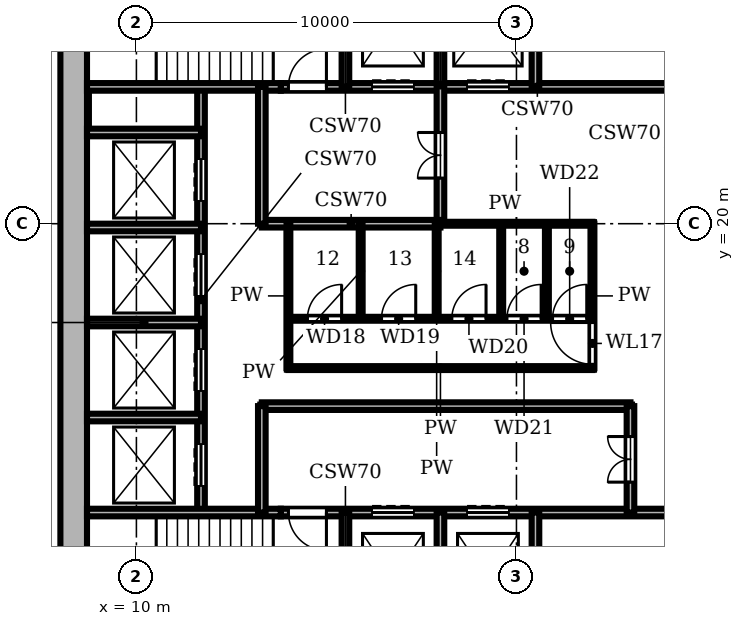
"""IFC4 building model, lengths in metres.
Left out: names, types, materials, properties, quantities, classifications, styles, units other than length and angle.
Written with IfcOpenShell. Run it as: python <this file> out.ifc"""

import sys

from ifc_helpers import new_model, si_unit, direction, frame, frame_2d, origin, place, context, subcontext, project, spatial, rectangle, extrude, element, fill, save


model = new_model("IFC4")
c1 = context("Model", 3, precision=1e-05, world=origin(), true_north=direction((0.0, 1.0)))
c2 = subcontext(c1, "Body", "Model", "MODEL_VIEW")
j1 = project(units=[si_unit("LENGTHUNIT", "METRE"), si_unit("PLANEANGLEUNIT", "RADIAN")], contexts=[c1])
p1 = place(None, origin())
s1 = spatial("IfcSite", under=j1, at=p1, CompositionType="ELEMENT")
p2 = place(p1, origin())
s2 = spatial("IfcBuilding", under=s1, at=p2, CompositionType="ELEMENT")
p3 = place(p2, frame((0.0, 0.0, 178.5)))
s3 = spatial("IfcBuildingStorey", under=s2, at=p3, CompositionType="ELEMENT", Elevation=178.5)
p4 = place(p3, frame((8.35, 27.3, 0.0), z_axis=(0.0, 0.0, 1.0), x_axis=(0.0, -1.0, 0.0)))
e1 = element("IfcWall", 1, at=p4, inside=s3, PredefinedType="SHEAR", context=c2, shape_type="SweptSolid", body=[
    extrude(rectangle(XDim=18.6, YDim=0.7, at=frame_2d((9.3, 0.0))), origin(), (0.0, 0.0, 1.0), 3.9),
])
p5 = place(p3, frame((8.7, 12.4, 0.0), z_axis=(0.0, 0.0, 1.0), x_axis=(1.0, 0.0, 0.0)))
e2 = element("IfcWall", 2, at=p5, inside=s3, PredefinedType="SHEAR", context=c2, shape_type="SweptSolid", body=[
    extrude(rectangle(XDim=5.1, YDim=0.2, at=frame_2d((2.55, 0.0))), origin(), (0.0, 0.0, 1.0), 3.58),
])
p6 = place(p3, frame((13.8, 12.4, 0.0), z_axis=(0.0, 0.0, 1.0), x_axis=(1.0, 0.0, 0.0)))
e3 = element("IfcWall", 3, at=p6, inside=s3, PredefinedType="SHEAR", context=c2, shape_type="SweptSolid", body=[
    extrude(rectangle(XDim=13.5, YDim=0.2, at=frame_2d((6.75, 0.0))), origin(), (0.0, 0.0, 1.0), 3.58),
])
p7 = place(p6, frame((2.4, 0.0, 0.0)))
e4 = element("IfcOpeningElement", 4, at=p7, cuts=e3, PredefinedType="OPENING", context=c2, shape_type="SweptSolid", body=[
    extrude(rectangle(XDim=1.1, YDim=2.1, at=frame_2d((0.55, 1.05))), frame((0.0, 0.11, 0.0), z_axis=(0.0, -1.0, 0.0), x_axis=(1.0, 0.0, 0.0)), (0.0, 0.0, 1.0), 0.22),
])
p8 = place(p6, frame((4.9, 0.0, 0.0)))
e5 = element("IfcOpeningElement", 5, at=p8, cuts=e3, PredefinedType="OPENING", context=c2, shape_type="SweptSolid", body=[
    extrude(rectangle(XDim=1.1, YDim=2.1, at=frame_2d((0.55, 1.05))), frame((0.0, 0.11, 0.0), z_axis=(0.0, -1.0, 0.0), x_axis=(1.0, 0.0, 0.0)), (0.0, 0.0, 1.0), 0.22),
])
p9 = place(p6, frame((0.2, 0.0, 0.0)))
e6 = element("IfcOpeningElement", 6, at=p9, cuts=e3, PredefinedType="OPENING", context=c2, shape_type="SweptSolid", body=[
    extrude(rectangle(XDim=1.0, YDim=2.1, at=frame_2d((0.5, 1.05))), frame((0.0, 0.11, 0.0), z_axis=(0.0, -1.0, 0.0), x_axis=(1.0, 0.0, 0.0)), (0.0, 0.0, 1.0), 0.22),
])
p10 = place(p3, frame((8.7, 14.9, 0.0), z_axis=(0.0, 0.0, 1.0), x_axis=(1.0, 0.0, 0.0)))
e7 = element("IfcWall", 7, at=p10, inside=s3, PredefinedType="SHEAR", context=c2, shape_type="SweptSolid", body=[
    extrude(rectangle(XDim=3.0, YDim=0.2, at=frame_2d((1.5, 0.0))), origin(), (0.0, 0.0, 1.0), 3.58),
])
p11 = place(p3, frame((13.3, 15.2, 0.0), z_axis=(0.0, 0.0, 1.0), x_axis=(1.0, 0.0, 0.0)))
e8 = element("IfcWall", 8, at=p11, inside=s3, PredefinedType="SHEAR", context=c2, shape_type="SweptSolid", body=[
    extrude(rectangle(XDim=9.7, YDim=0.2, at=frame_2d((4.85, 0.0))), origin(), (0.0, 0.0, 1.0), 3.58),
])
p12 = place(p3, frame((14.0, 16.2, 0.0), z_axis=(0.0, 0.0, 1.0), x_axis=(1.0, 0.0, 0.0)))
e9 = element("IfcWall", 9, at=p12, inside=s3, PredefinedType="PARTITIONING", context=c2, shape_type="SweptSolid", body=[
    extrude(rectangle(XDim=8.0, YDim=0.1, at=frame_2d((4.0, 0.0))), origin(), (0.0, 0.0, 1.0), 3.58),
])
p13 = place(p3, frame((8.7, 17.4, 0.0), z_axis=(0.0, 0.0, 1.0), x_axis=(1.0, 0.0, 0.0)))
e10 = element("IfcWall", 10, at=p13, inside=s3, PredefinedType="SHEAR", context=c2, shape_type="SweptSolid", body=[
    extrude(rectangle(XDim=3.0, YDim=0.2, at=frame_2d((1.5, 0.0))), origin(), (0.0, 0.0, 1.0), 3.58),
])
p14 = place(p3, frame((14.0, 17.5, 0.0), z_axis=(0.0, 0.0, 1.0), x_axis=(1.0, 0.0, 0.0)))
e11 = element("IfcWall", 11, at=p14, inside=s3, PredefinedType="PARTITIONING", context=c2, shape_type="SweptSolid", body=[
    extrude(rectangle(XDim=8.0, YDim=0.1, at=frame_2d((4.0, 0.0))), origin(), (0.0, 0.0, 1.0), 3.58),
])
p15 = place(p14, frame((0.5, 0.0, 0.0)))
e12 = element("IfcOpeningElement", 12, at=p15, cuts=e11, PredefinedType="OPENING", context=c2, shape_type="SweptSolid", body=[
    extrude(rectangle(XDim=0.9, YDim=2.1, at=frame_2d((0.45, 1.05))), frame((0.0, 0.06, 0.0), z_axis=(0.0, -1.0, 0.0), x_axis=(1.0, 0.0, 0.0)), (0.0, 0.0, 1.0), 0.12),
])
p16 = place(p14, frame((2.45, 0.0, 0.0)))
e13 = element("IfcOpeningElement", 13, at=p16, cuts=e11, PredefinedType="OPENING", context=c2, shape_type="SweptSolid", body=[
    extrude(rectangle(XDim=0.9, YDim=2.1, at=frame_2d((0.45, 1.05))), frame((0.0, 0.06, 0.0), z_axis=(0.0, -1.0, 0.0), x_axis=(1.0, 0.0, 0.0)), (0.0, 0.0, 1.0), 0.12),
])
p17 = place(p14, frame((4.3, 0.0, 0.0)))
e14 = element("IfcOpeningElement", 14, at=p17, cuts=e11, PredefinedType="OPENING", context=c2, shape_type="SweptSolid", body=[
    extrude(rectangle(XDim=0.9, YDim=2.1, at=frame_2d((0.45, 1.05))), frame((0.0, 0.06, 0.0), z_axis=(0.0, -1.0, 0.0), x_axis=(1.0, 0.0, 0.0)), (0.0, 0.0, 1.0), 0.12),
])
p18 = place(p14, frame((5.75, 0.0, 0.0)))
e15 = element("IfcOpeningElement", 15, at=p18, cuts=e11, PredefinedType="OPENING", context=c2, shape_type="SweptSolid", body=[
    extrude(rectangle(XDim=0.9, YDim=2.1, at=frame_2d((0.45, 1.05))), frame((0.0, 0.06, 0.0), z_axis=(0.0, -1.0, 0.0), x_axis=(1.0, 0.0, 0.0)), (0.0, 0.0, 1.0), 0.12),
])
p19 = place(p14, frame((6.95, 0.0, 0.0)))
e16 = element("IfcOpeningElement", 16, at=p19, cuts=e11, PredefinedType="OPENING", context=c2, shape_type="SweptSolid", body=[
    extrude(rectangle(XDim=0.9, YDim=2.1, at=frame_2d((0.45, 1.05))), frame((0.0, 0.06, 0.0), z_axis=(0.0, -1.0, 0.0), x_axis=(1.0, 0.0, 0.0)), (0.0, 0.0, 1.0), 0.12),
])
p20 = place(p3, frame((8.7, 19.9, 0.0), z_axis=(0.0, 0.0, 1.0), x_axis=(1.0, 0.0, 0.0)))
e17 = element("IfcWall", 17, at=p20, inside=s3, PredefinedType="SHEAR", context=c2, shape_type="SweptSolid", body=[
    extrude(rectangle(XDim=3.0, YDim=0.2, at=frame_2d((1.5, 0.0))), origin(), (0.0, 0.0, 1.0), 3.58),
])
p21 = place(p3, frame((18.0, 20.0, 0.0), z_axis=(0.0, 0.0, 1.0), x_axis=(1.0, 0.0, 0.0)))
e18 = element("IfcWall", 18, at=p21, inside=s3, PredefinedType="PARTITIONING", context=c2, shape_type="SweptSolid", body=[
    extrude(rectangle(XDim=4.0, YDim=0.1, at=frame_2d((2.0, 0.0))), origin(), (0.0, 0.0, 1.0), 3.58),
])
p22 = place(p3, frame((13.3, 20.0, 0.0), z_axis=(0.0, 0.0, 1.0), x_axis=(1.0, 0.0, 0.0)))
e19 = element("IfcWall", 19, at=p22, inside=s3, PredefinedType="SHEAR", context=c2, shape_type="SweptSolid", body=[
    extrude(rectangle(XDim=4.7, YDim=0.2, at=frame_2d((2.35, 0.0))), origin(), (0.0, 0.0, 1.0), 3.58),
])
p23 = place(p3, frame((8.7, 22.4, 0.0), z_axis=(0.0, 0.0, 1.0), x_axis=(1.0, 0.0, 0.0)))
e20 = element("IfcWall", 20, at=p23, inside=s3, PredefinedType="SHEAR", context=c2, shape_type="SweptSolid", body=[
    extrude(rectangle(XDim=3.0, YDim=0.2, at=frame_2d((1.5, 0.0))), origin(), (0.0, 0.0, 1.0), 3.58),
])
p24 = place(p3, frame((8.7, 23.6, 0.0), z_axis=(0.0, 0.0, 1.0), x_axis=(1.0, 0.0, 0.0)))
e21 = element("IfcWall", 21, at=p24, inside=s3, PredefinedType="SHEAR", context=c2, shape_type="SweptSolid", body=[
    extrude(rectangle(XDim=5.1, YDim=0.2, at=frame_2d((2.55, 0.0))), origin(), (0.0, 0.0, 1.0), 3.58),
])
p25 = place(p3, frame((13.8, 23.6, 0.0), z_axis=(0.0, 0.0, 1.0), x_axis=(1.0, 0.0, 0.0)))
e22 = element("IfcWall", 22, at=p25, inside=s3, PredefinedType="SHEAR", context=c2, shape_type="SweptSolid", body=[
    extrude(rectangle(XDim=13.5, YDim=0.2, at=frame_2d((6.75, 0.0))), origin(), (0.0, 0.0, 1.0), 3.58),
])
p26 = place(p25, frame((2.4, 0.0, 0.0)))
e23 = element("IfcOpeningElement", 23, at=p26, cuts=e22, PredefinedType="OPENING", context=c2, shape_type="SweptSolid", body=[
    extrude(rectangle(XDim=1.1, YDim=2.1, at=frame_2d((0.55, 1.05))), frame((0.0, 0.11, 0.0), z_axis=(0.0, -1.0, 0.0), x_axis=(1.0, 0.0, 0.0)), (0.0, 0.0, 1.0), 0.22),
])
p27 = place(p25, frame((4.9, 0.0, 0.0)))
e24 = element("IfcOpeningElement", 24, at=p27, cuts=e22, PredefinedType="OPENING", context=c2, shape_type="SweptSolid", body=[
    extrude(rectangle(XDim=1.1, YDim=2.1, at=frame_2d((0.55, 1.05))), frame((0.0, 0.11, 0.0), z_axis=(0.0, -1.0, 0.0), x_axis=(1.0, 0.0, 0.0)), (0.0, 0.0, 1.0), 0.22),
])
p28 = place(p25, frame((0.2, 0.0, 0.0)))
e25 = element("IfcOpeningElement", 25, at=p28, cuts=e22, PredefinedType="OPENING", context=c2, shape_type="SweptSolid", body=[
    extrude(rectangle(XDim=1.0, YDim=2.1, at=frame_2d((0.5, 1.05))), frame((0.0, 0.11, 0.0), z_axis=(0.0, -1.0, 0.0), x_axis=(1.0, 0.0, 0.0)), (0.0, 0.0, 1.0), 0.22),
])
p29 = place(p3, frame((11.7, 12.4, 0.0), z_axis=(0.0, 0.0, 1.0), x_axis=(0.0, 1.0, 0.0)))
e26 = element("IfcWall", 26, at=p29, inside=s3, PredefinedType="SHEAR", context=c2, shape_type="SweptSolid", body=[
    extrude(rectangle(XDim=11.2, YDim=0.2, at=frame_2d((5.6, 0.0))), origin(), (0.0, 0.0, 1.0), 3.58),
])
p30 = place(p29, frame((0.7, 0.0, 0.0)))
e27 = element("IfcOpeningElement", 27, at=p30, cuts=e26, PredefinedType="OPENING", context=c2, shape_type="SweptSolid", body=[
    extrude(rectangle(XDim=1.1, YDim=2.1, at=frame_2d((0.55, 1.05))), frame((0.0, 0.11, 0.0), z_axis=(0.0, -1.0, 0.0), x_axis=(1.0, 0.0, 0.0)), (0.0, 0.0, 1.0), 0.22),
])
p31 = place(p29, frame((3.2, 0.0, 0.0)))
e28 = element("IfcOpeningElement", 28, at=p31, cuts=e26, PredefinedType="OPENING", context=c2, shape_type="SweptSolid", body=[
    extrude(rectangle(XDim=1.1, YDim=2.1, at=frame_2d((0.55, 1.05))), frame((0.0, 0.11, 0.0), z_axis=(0.0, -1.0, 0.0), x_axis=(1.0, 0.0, 0.0)), (0.0, 0.0, 1.0), 0.22),
])
p32 = place(p29, frame((5.7, 0.0, 0.0)))
e29 = element("IfcOpeningElement", 29, at=p32, cuts=e26, PredefinedType="OPENING", context=c2, shape_type="SweptSolid", body=[
    extrude(rectangle(XDim=1.1, YDim=2.1, at=frame_2d((0.55, 1.05))), frame((0.0, 0.11, 0.0), z_axis=(0.0, -1.0, 0.0), x_axis=(1.0, 0.0, 0.0)), (0.0, 0.0, 1.0), 0.22),
])
p33 = place(p29, frame((8.2, 0.0, 0.0)))
e30 = element("IfcOpeningElement", 30, at=p33, cuts=e26, PredefinedType="OPENING", context=c2, shape_type="SweptSolid", body=[
    extrude(rectangle(XDim=1.1, YDim=2.1, at=frame_2d((0.55, 1.05))), frame((0.0, 0.11, 0.0), z_axis=(0.0, -1.0, 0.0), x_axis=(1.0, 0.0, 0.0)), (0.0, 0.0, 1.0), 0.22),
])
p34 = place(p3, frame((13.3, 12.4, 0.0), z_axis=(0.0, 0.0, 1.0), x_axis=(0.0, 1.0, 0.0)))
e31 = element("IfcWall", 31, at=p34, inside=s3, PredefinedType="SHEAR", context=c2, shape_type="SweptSolid", body=[
    extrude(rectangle(XDim=2.8, YDim=0.2, at=frame_2d((1.4, 0.0))), origin(), (0.0, 0.0, 1.0), 3.58),
])
p35 = place(p3, frame((13.3, 20.0, 0.0), z_axis=(0.0, 0.0, 1.0), x_axis=(0.0, 1.0, 0.0)))
e32 = element("IfcWall", 32, at=p35, inside=s3, PredefinedType="SHEAR", context=c2, shape_type="SweptSolid", body=[
    extrude(rectangle(XDim=3.6, YDim=0.2, at=frame_2d((1.8, 0.0))), origin(), (0.0, 0.0, 1.0), 3.58),
])
p36 = place(p3, frame((14.0, 16.2, 0.0), z_axis=(0.0, 0.0, 1.0), x_axis=(0.0, 1.0, 0.0)))
e33 = element("IfcWall", 33, at=p36, inside=s3, PredefinedType="PARTITIONING", context=c2, shape_type="SweptSolid", body=[
    extrude(rectangle(XDim=3.8, YDim=0.1, at=frame_2d((1.9, 0.0))), origin(), (0.0, 0.0, 1.0), 3.58),
])
for number, where, z_axis, x_axis in (
    (34, (15.5, 8.7, 0.0), (0.0, 0.0, 1.0), (0.0, 1.0, 0.0)),
    (35, (15.5, 23.6, 0.0), (0.0, 0.0, 1.0), (0.0, 1.0, 0.0)),
):
    element("IfcWall", number, at=place(p3, frame(where, z_axis=z_axis, x_axis=x_axis)), inside=s3, PredefinedType="SHEAR", context=c2, shape_type="SweptSolid", body=[
        extrude(rectangle(XDim=3.7, YDim=0.2, at=frame_2d((1.85, 0.0))), origin(), (0.0, 0.0, 1.0), 3.58),
    ])
for number, where, z_axis, x_axis in (
    (36, (15.9, 17.5, 0.0), (0.0, 0.0, 1.0), (0.0, 1.0, 0.0)),
    (37, (17.9, 17.5, 0.0), (0.0, 0.0, 1.0), (0.0, 1.0, 0.0)),
):
    element("IfcWall", number, at=place(p3, frame(where, z_axis=z_axis, x_axis=x_axis)), inside=s3, PredefinedType="PARTITIONING", context=c2, shape_type="SweptSolid", body=[
        extrude(rectangle(XDim=2.5, YDim=0.1, at=frame_2d((1.25, 0.0))), origin(), (0.0, 0.0, 1.0), 3.58),
    ])
p37 = place(p3, frame((18.0, 8.7, 0.0), z_axis=(0.0, 0.0, 1.0), x_axis=(0.0, 1.0, 0.0)))
e38 = element("IfcWall", 38, at=p37, inside=s3, PredefinedType="SHEAR", context=c2, shape_type="SweptSolid", body=[
    extrude(rectangle(XDim=3.7, YDim=0.2, at=frame_2d((1.85, 0.0))), origin(), (0.0, 0.0, 1.0), 3.58),
])
p38 = place(p3, frame((18.0, 20.0, 0.0), z_axis=(0.0, 0.0, 1.0), x_axis=(0.0, 1.0, 0.0)))
e39 = element("IfcWall", 39, at=p38, inside=s3, PredefinedType="SHEAR", context=c2, shape_type="SweptSolid", body=[
    extrude(rectangle(XDim=7.3, YDim=0.2, at=frame_2d((3.65, 0.0))), origin(), (0.0, 0.0, 1.0), 3.58),
])
p39 = place(p38, frame((1.2, 0.0, 0.0)))
e40 = element("IfcOpeningElement", 40, at=p39, cuts=e39, PredefinedType="OPENING", context=c2, shape_type="SweptSolid", body=[
    extrude(rectangle(XDim=1.2, YDim=2.1, at=frame_2d((0.6, 1.05))), frame((0.0, 0.11, 0.0), z_axis=(0.0, -1.0, 0.0), x_axis=(1.0, 0.0, 0.0)), (0.0, 0.0, 1.0), 0.22),
])
p40 = place(p3, frame((19.6, 17.5, 0.0), z_axis=(0.0, 0.0, 1.0), x_axis=(0.0, 1.0, 0.0)))
e41 = element("IfcWall", 41, at=p40, inside=s3, PredefinedType="PARTITIONING", context=c2, shape_type="SweptSolid", body=[
    extrude(rectangle(XDim=2.5, YDim=0.1, at=frame_2d((1.25, 0.0))), origin(), (0.0, 0.0, 1.0), 3.58),
])
for number, where, z_axis, x_axis in (
    (42, (20.5, 8.7, 0.0), (0.0, 0.0, 1.0), (0.0, 1.0, 0.0)),
    (43, (20.5, 23.6, 0.0), (0.0, 0.0, 1.0), (0.0, 1.0, 0.0)),
):
    element("IfcWall", number, at=place(p3, frame(where, z_axis=z_axis, x_axis=x_axis)), inside=s3, PredefinedType="SHEAR", context=c2, shape_type="SweptSolid", body=[
        extrude(rectangle(XDim=3.7, YDim=0.2, at=frame_2d((1.85, 0.0))), origin(), (0.0, 0.0, 1.0), 3.58),
    ])
p41 = place(p3, frame((20.8, 17.5, 0.0), z_axis=(0.0, 0.0, 1.0), x_axis=(0.0, 1.0, 0.0)))
e44 = element("IfcWall", 44, at=p41, inside=s3, PredefinedType="PARTITIONING", context=c2, shape_type="SweptSolid", body=[
    extrude(rectangle(XDim=2.5, YDim=0.1, at=frame_2d((1.25, 0.0))), origin(), (0.0, 0.0, 1.0), 3.58),
])
p42 = place(p3, frame((22.0, 16.2, 0.0), z_axis=(0.0, 0.0, 1.0), x_axis=(0.0, 1.0, 0.0)))
e45 = element("IfcWall", 45, at=p42, inside=s3, PredefinedType="PARTITIONING", context=c2, shape_type="SweptSolid", body=[
    extrude(rectangle(XDim=3.8, YDim=0.1, at=frame_2d((1.9, 0.0))), origin(), (0.0, 0.0, 1.0), 3.58),
])
p43 = place(p42, frame((0.1, 0.0, 0.0)))
e46 = element("IfcOpeningElement", 46, at=p43, cuts=e45, PredefinedType="OPENING", context=c2, shape_type="SweptSolid", body=[
    extrude(rectangle(XDim=1.1, YDim=2.1, at=frame_2d((0.55, 1.05))), frame((0.0, 0.06, 0.0), z_axis=(0.0, -1.0, 0.0), x_axis=(1.0, 0.0, 0.0)), (0.0, 0.0, 1.0), 0.12),
])
p44 = place(p3, frame((23.0, 12.4, 0.0), z_axis=(0.0, 0.0, 1.0), x_axis=(0.0, 1.0, 0.0)))
e47 = element("IfcWall", 47, at=p44, inside=s3, PredefinedType="SHEAR", context=c2, shape_type="SweptSolid", body=[
    extrude(rectangle(XDim=2.8, YDim=0.2, at=frame_2d((1.4, 0.0))), origin(), (0.0, 0.0, 1.0), 3.58),
])
p45 = place(p44, frame((0.8, 0.0, 0.0)))
e48 = element("IfcOpeningElement", 48, at=p45, cuts=e47, PredefinedType="OPENING", context=c2, shape_type="SweptSolid", body=[
    extrude(rectangle(XDim=1.2, YDim=2.1, at=frame_2d((0.6, 1.05))), frame((0.0, 0.11, 0.0), z_axis=(0.0, -1.0, 0.0), x_axis=(1.0, 0.0, 0.0)), (0.0, 0.0, 1.0), 0.22),
])
p46 = place(p30, origin())
e49 = element("IfcDoor", 49, at=p46, inside=s3, OperationType="DOUBLE_DOOR_SLIDING", PredefinedType="DOOR", context=c2, shape_type="SweptSolid", body=[
    extrude(rectangle(XDim=1.1, YDim=2.1, at=frame_2d((0.55, 1.05))), frame((0.0, 0.025, 0.0), z_axis=(0.0, -1.0, 0.0), x_axis=(1.0, 0.0, 0.0)), (0.0, 0.0, 1.0), 0.05),
])
fill(e27, e49)
p47 = place(p31, origin())
e50 = element("IfcDoor", 50, at=p47, inside=s3, OperationType="DOUBLE_DOOR_SLIDING", PredefinedType="DOOR", context=c2, shape_type="SweptSolid", body=[
    extrude(rectangle(XDim=1.1, YDim=2.1, at=frame_2d((0.55, 1.05))), frame((0.0, 0.025, 0.0), z_axis=(0.0, -1.0, 0.0), x_axis=(1.0, 0.0, 0.0)), (0.0, 0.0, 1.0), 0.05),
])
fill(e28, e50)
p48 = place(p32, origin())
e51 = element("IfcDoor", 51, at=p48, inside=s3, OperationType="DOUBLE_DOOR_SLIDING", PredefinedType="DOOR", context=c2, shape_type="SweptSolid", body=[
    extrude(rectangle(XDim=1.1, YDim=2.1, at=frame_2d((0.55, 1.05))), frame((0.0, 0.025, 0.0), z_axis=(0.0, -1.0, 0.0), x_axis=(1.0, 0.0, 0.0)), (0.0, 0.0, 1.0), 0.05),
])
fill(e29, e51)
p49 = place(p33, origin())
e52 = element("IfcDoor", 52, at=p49, inside=s3, OperationType="DOUBLE_DOOR_SLIDING", PredefinedType="DOOR", context=c2, shape_type="SweptSolid", body=[
    extrude(rectangle(XDim=1.1, YDim=2.1, at=frame_2d((0.55, 1.05))), frame((0.0, 0.025, 0.0), z_axis=(0.0, -1.0, 0.0), x_axis=(1.0, 0.0, 0.0)), (0.0, 0.0, 1.0), 0.05),
])
fill(e30, e52)
p50 = place(p7, origin())
e53 = element("IfcDoor", 53, at=p50, inside=s3, OperationType="DOUBLE_DOOR_SLIDING", PredefinedType="DOOR", context=c2, shape_type="SweptSolid", body=[
    extrude(rectangle(XDim=1.1, YDim=2.1, at=frame_2d((0.55, 1.05))), frame((0.0, 0.025, 0.0), z_axis=(0.0, -1.0, 0.0), x_axis=(1.0, 0.0, 0.0)), (0.0, 0.0, 1.0), 0.05),
])
fill(e4, e53)
p51 = place(p8, origin())
e54 = element("IfcDoor", 54, at=p51, inside=s3, OperationType="DOUBLE_DOOR_SLIDING", PredefinedType="DOOR", context=c2, shape_type="SweptSolid", body=[
    extrude(rectangle(XDim=1.1, YDim=2.1, at=frame_2d((0.55, 1.05))), frame((0.0, 0.025, 0.0), z_axis=(0.0, -1.0, 0.0), x_axis=(1.0, 0.0, 0.0)), (0.0, 0.0, 1.0), 0.05),
])
fill(e5, e54)
p52 = place(p26, origin())
e55 = element("IfcDoor", 55, at=p52, inside=s3, OperationType="DOUBLE_DOOR_SLIDING", PredefinedType="DOOR", context=c2, shape_type="SweptSolid", body=[
    extrude(rectangle(XDim=1.1, YDim=2.1, at=frame_2d((0.55, 1.05))), frame((0.0, 0.025, 0.0), z_axis=(0.0, -1.0, 0.0), x_axis=(1.0, 0.0, 0.0)), (0.0, 0.0, 1.0), 0.05),
])
fill(e23, e55)
p53 = place(p27, origin())
e56 = element("IfcDoor", 56, at=p53, inside=s3, OperationType="DOUBLE_DOOR_SLIDING", PredefinedType="DOOR", context=c2, shape_type="SweptSolid", body=[
    extrude(rectangle(XDim=1.1, YDim=2.1, at=frame_2d((0.55, 1.05))), frame((0.0, 0.025, 0.0), z_axis=(0.0, -1.0, 0.0), x_axis=(1.0, 0.0, 0.0)), (0.0, 0.0, 1.0), 0.05),
])
fill(e24, e56)
p54 = place(p9, frame((1.0, 0.0, 0.0), z_axis=(0.0, 0.0, 1.0), x_axis=(-1.0, 0.0, 0.0)))
e57 = element("IfcDoor", 57, at=p54, inside=s3, OperationType="SINGLE_SWING_LEFT", PredefinedType="DOOR", context=c2, shape_type="SweptSolid", body=[
    extrude(rectangle(XDim=1.0, YDim=2.1, at=frame_2d((0.5, 1.05))), frame((0.0, 0.025, 0.0), z_axis=(0.0, -1.0, 0.0), x_axis=(1.0, 0.0, 0.0)), (0.0, 0.0, 1.0), 0.05),
])
fill(e6, e57)
p55 = place(p28, origin())
e58 = element("IfcDoor", 58, at=p55, inside=s3, OperationType="SINGLE_SWING_RIGHT", PredefinedType="DOOR", context=c2, shape_type="SweptSolid", body=[
    extrude(rectangle(XDim=1.0, YDim=2.1, at=frame_2d((0.5, 1.05))), frame((0.0, 0.025, 0.0), z_axis=(0.0, -1.0, 0.0), x_axis=(1.0, 0.0, 0.0)), (0.0, 0.0, 1.0), 0.05),
])
fill(e25, e58)
p56 = place(p45, origin())
e59 = element("IfcDoor", 59, at=p56, inside=s3, OperationType="DOUBLE_DOOR_SINGLE_SWING", PredefinedType="DOOR", context=c2, shape_type="SweptSolid", body=[
    extrude(rectangle(XDim=1.2, YDim=2.1, at=frame_2d((0.6, 1.05))), frame((0.0, 0.025, 0.0), z_axis=(0.0, -1.0, 0.0), x_axis=(1.0, 0.0, 0.0)), (0.0, 0.0, 1.0), 0.05),
])
fill(e48, e59)
p57 = place(p39, origin())
e60 = element("IfcDoor", 60, at=p57, inside=s3, OperationType="DOUBLE_DOOR_SINGLE_SWING", PredefinedType="DOOR", context=c2, shape_type="SweptSolid", body=[
    extrude(rectangle(XDim=1.2, YDim=2.1, at=frame_2d((0.6, 1.05))), frame((0.0, 0.025, 0.0), z_axis=(0.0, -1.0, 0.0), x_axis=(1.0, 0.0, 0.0)), (0.0, 0.0, 1.0), 0.05),
])
fill(e40, e60)
p58 = place(p43, origin())
e61 = element("IfcDoor", 61, at=p58, inside=s3, OperationType="SINGLE_SWING_RIGHT", PredefinedType="DOOR", context=c2, shape_type="SweptSolid", body=[
    extrude(rectangle(XDim=1.1, YDim=2.1, at=frame_2d((0.55, 1.05))), frame((0.0, 0.025, 0.0), z_axis=(0.0, -1.0, 0.0), x_axis=(1.0, 0.0, 0.0)), (0.0, 0.0, 1.0), 0.05),
])
fill(e46, e61)
p59 = place(p15, origin())
e62 = element("IfcDoor", 62, at=p59, inside=s3, OperationType="SINGLE_SWING_RIGHT", PredefinedType="DOOR", context=c2, shape_type="SweptSolid", body=[
    extrude(rectangle(XDim=0.9, YDim=2.1, at=frame_2d((0.45, 1.05))), frame((0.0, 0.025, 0.0), z_axis=(0.0, -1.0, 0.0), x_axis=(1.0, 0.0, 0.0)), (0.0, 0.0, 1.0), 0.05),
])
fill(e12, e62)
p60 = place(p16, origin())
e63 = element("IfcDoor", 63, at=p60, inside=s3, OperationType="SINGLE_SWING_RIGHT", PredefinedType="DOOR", context=c2, shape_type="SweptSolid", body=[
    extrude(rectangle(XDim=0.9, YDim=2.1, at=frame_2d((0.45, 1.05))), frame((0.0, 0.025, 0.0), z_axis=(0.0, -1.0, 0.0), x_axis=(1.0, 0.0, 0.0)), (0.0, 0.0, 1.0), 0.05),
])
fill(e13, e63)
p61 = place(p17, origin())
e64 = element("IfcDoor", 64, at=p61, inside=s3, OperationType="SINGLE_SWING_RIGHT", PredefinedType="DOOR", context=c2, shape_type="SweptSolid", body=[
    extrude(rectangle(XDim=0.9, YDim=2.1, at=frame_2d((0.45, 1.05))), frame((0.0, 0.025, 0.0), z_axis=(0.0, -1.0, 0.0), x_axis=(1.0, 0.0, 0.0)), (0.0, 0.0, 1.0), 0.05),
])
fill(e14, e64)
p62 = place(p18, origin())
e65 = element("IfcDoor", 65, at=p62, inside=s3, OperationType="SINGLE_SWING_RIGHT", PredefinedType="DOOR", context=c2, shape_type="SweptSolid", body=[
    extrude(rectangle(XDim=0.9, YDim=2.1, at=frame_2d((0.45, 1.05))), frame((0.0, 0.025, 0.0), z_axis=(0.0, -1.0, 0.0), x_axis=(1.0, 0.0, 0.0)), (0.0, 0.0, 1.0), 0.05),
])
fill(e15, e65)
p63 = place(p19, origin())
e66 = element("IfcDoor", 66, at=p63, inside=s3, OperationType="SINGLE_SWING_RIGHT", PredefinedType="DOOR", context=c2, shape_type="SweptSolid", body=[
    extrude(rectangle(XDim=0.9, YDim=2.1, at=frame_2d((0.45, 1.05))), frame((0.0, 0.025, 0.0), z_axis=(0.0, -1.0, 0.0), x_axis=(1.0, 0.0, 0.0)), (0.0, 0.0, 1.0), 0.05),
])
fill(e16, e66)
save(model, sys.argv[1])
